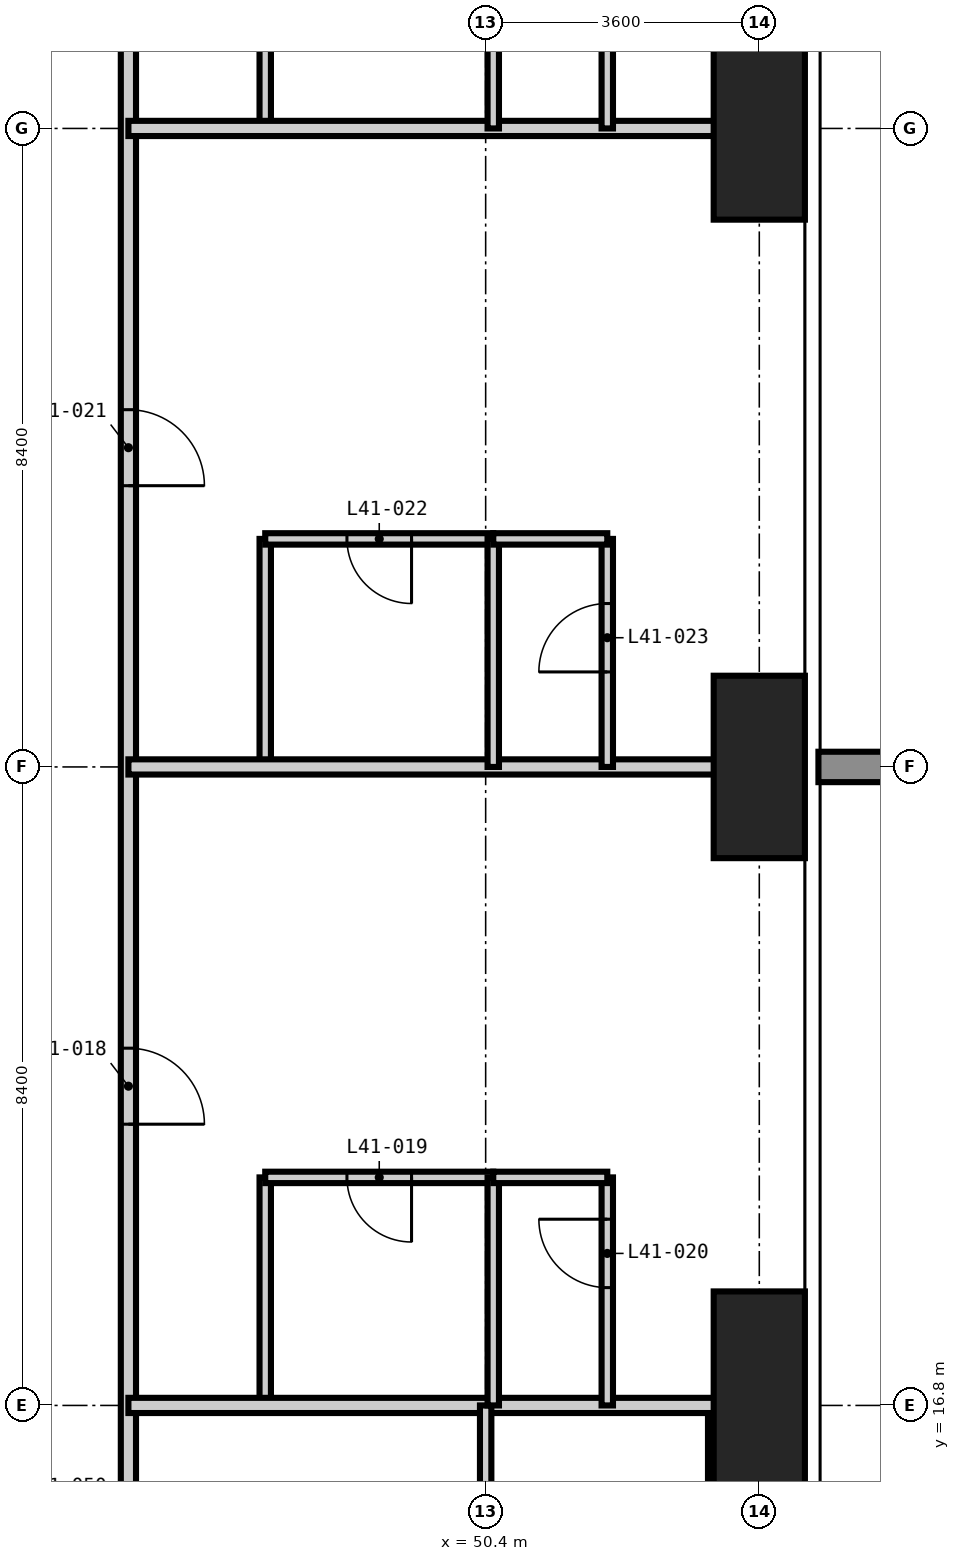
"""IFC4 building model, lengths in metres.
Left out: names, types, materials, properties, quantities, classifications, styles, units other than length and angle.
Written with IfcOpenShell. Run it as: python <this file> out.ifc"""

import sys

from ifc_helpers import new_model, si_unit, direction, frame, frame_2d, origin, origin_2d, place, context, subcontext, project, spatial, rectangle, extrude, element, fill, save


model = new_model("IFC4")
c1 = context("Model", 3, precision=1e-05, world=origin(), true_north=direction((0.0, 1.0)))
c2 = subcontext(c1, "Body", "Model", "MODEL_VIEW")
j1 = project(units=[si_unit("LENGTHUNIT", "METRE"), si_unit("PLANEANGLEUNIT", "RADIAN")], contexts=[c1])
p1 = place(None, origin())
s1 = spatial("IfcSite", under=j1, at=p1, CompositionType="ELEMENT")
p2 = place(p1, origin())
s2 = spatial("IfcBuilding", under=s1, at=p2, CompositionType="ELEMENT")
p3 = place(p2, frame((0.0, 0.0, 162.6)))
s3 = spatial("IfcBuildingStorey", under=s2, at=p3, CompositionType="ELEMENT", Elevation=162.6)
p4 = place(p3, frame((54.0, 16.8, -0.35), z_axis=(0.0, 0.0, 1.0), x_axis=(1.0, 0.0, 0.0)))
e1 = element("IfcColumn", 1, at=p4, inside=s3, PredefinedType="COLUMN", context=c2, shape_type="SweptSolid", body=[
    extrude(rectangle(XDim=1.2, YDim=3.0, at=origin_2d()), origin(), (0.0, 0.0, 1.0), 3.6),
])
for number, where, z_axis, x_axis in (
    (2, (54.0, 25.2, -0.35), (0.0, 0.0, 1.0), (1.0, 0.0, 0.0)),
    (3, (54.0, 33.6, -0.35), (0.0, 0.0, 1.0), (1.0, 0.0, 0.0)),
):
    element("IfcColumn", number, at=place(p3, frame(where, z_axis=z_axis, x_axis=x_axis)), inside=s3, PredefinedType="COLUMN", context=c2, shape_type="SweptSolid", body=[
        extrude(rectangle(XDim=1.2, YDim=2.4, at=origin_2d()), origin(), (0.0, 0.0, 1.0), 3.6),
    ])
for number, where, z_axis, x_axis in (
    (4, (47.5, 16.8, 0.0), (0.0, 0.0, 1.0), (0.0, 1.0, 0.0)),
    (5, (47.5, 25.2, 0.0), (0.0, 0.0, 1.0), (0.0, 1.0, 0.0)),
    (6, (47.5, 33.6, 0.0), (0.0, 0.0, 1.0), (0.0, 1.0, 0.0)),
):
    element("IfcWall", number, at=place(p3, frame(where, z_axis=z_axis, x_axis=x_axis)), inside=s3, PredefinedType="PARTITIONING", context=c2, shape_type="SweptSolid", body=[
        extrude(rectangle(XDim=3.0, YDim=0.15, at=frame_2d((1.5, 0.0))), origin(), (0.0, 0.0, 1.0), 3.25),
    ])
p5 = place(p3, frame((53.4, 13.2, 0.0), z_axis=(0.0, 0.0, 1.0), x_axis=(0.0, 1.0, 0.0)))
e7 = element("IfcWall", 7, at=p5, inside=s3, PredefinedType="PARTITIONING", context=c2, shape_type="SweptSolid", body=[
    extrude(rectangle(XDim=3.6, YDim=0.15, at=frame_2d((1.8, 0.0))), origin(), (0.0, 0.0, 1.0), 3.25),
])
p6 = place(p5, frame((1.175, 0.0, 0.0)))
e8 = element("IfcOpeningElement", 8, at=p6, cuts=e7, PredefinedType="OPENING", context=c2, shape_type="SweptSolid", body=[
    extrude(rectangle(XDim=0.85, YDim=2.1, at=frame_2d((0.425, 1.05))), frame((0.0, 0.085, 0.0), z_axis=(0.0, -1.0, 0.0), x_axis=(1.0, 0.0, 0.0)), (0.0, 0.0, 1.0), 0.17),
])
p7 = place(p3, frame((47.5, 19.8, 0.0), z_axis=(0.0, 0.0, 1.0), x_axis=(1.0, 0.0, 0.0)))
e9 = element("IfcWall", 9, at=p7, inside=s3, PredefinedType="PARTITIONING", context=c2, shape_type="SweptSolid", body=[
    extrude(rectangle(XDim=3.0, YDim=0.15, at=frame_2d((1.5, 0.0))), origin(), (0.0, 0.0, 1.0), 3.25),
])
p8 = place(p7, frame((1.075, 0.0, 0.0)))
e10 = element("IfcOpeningElement", 10, at=p8, cuts=e9, PredefinedType="OPENING", context=c2, shape_type="SweptSolid", body=[
    extrude(rectangle(XDim=0.85, YDim=2.1, at=frame_2d((0.425, 1.05))), frame((0.0, 0.085, 0.0), z_axis=(0.0, -1.0, 0.0), x_axis=(1.0, 0.0, 0.0)), (0.0, 0.0, 1.0), 0.17),
])
p9 = place(p3, frame((47.5, 28.2, 0.0), z_axis=(0.0, 0.0, 1.0), x_axis=(1.0, 0.0, 0.0)))
e11 = element("IfcWall", 11, at=p9, inside=s3, PredefinedType="PARTITIONING", context=c2, shape_type="SweptSolid", body=[
    extrude(rectangle(XDim=3.0, YDim=0.15, at=frame_2d((1.5, 0.0))), origin(), (0.0, 0.0, 1.0), 3.25),
])
p10 = place(p9, frame((1.075, 0.0, 0.0)))
e12 = element("IfcOpeningElement", 12, at=p10, cuts=e11, PredefinedType="OPENING", context=c2, shape_type="SweptSolid", body=[
    extrude(rectangle(XDim=0.85, YDim=2.1, at=frame_2d((0.425, 1.05))), frame((0.0, 0.085, 0.0), z_axis=(0.0, -1.0, 0.0), x_axis=(1.0, 0.0, 0.0)), (0.0, 0.0, 1.0), 0.17),
])
p11 = place(p3, frame((45.7, 44.5, 0.0), z_axis=(0.0, 0.0, 1.0), x_axis=(0.0, -1.0, 0.0)))
e13 = element("IfcWall", 13, at=p11, inside=s3, PredefinedType="PARTITIONING", context=c2, shape_type="SweptSolid", body=[
    extrude(rectangle(XDim=30.8, YDim=0.2, at=frame_2d((15.4, 0.0))), origin(), (0.0, 0.0, 1.0), 3.25),
])
p12 = place(p11, frame((23.0, 0.0, 0.0)))
e14 = element("IfcOpeningElement", 14, at=p12, cuts=e13, PredefinedType="OPENING", context=c2, shape_type="SweptSolid", body=[
    extrude(rectangle(XDim=1.0, YDim=2.2, at=frame_2d((0.5, 1.1))), frame((0.0, 0.11, 0.0), z_axis=(0.0, -1.0, 0.0), x_axis=(1.0, 0.0, 0.0)), (0.0, 0.0, 1.0), 0.22),
])
p13 = place(p11, frame((14.6, 0.0, 0.0)))
e15 = element("IfcOpeningElement", 15, at=p13, cuts=e13, PredefinedType="OPENING", context=c2, shape_type="SweptSolid", body=[
    extrude(rectangle(XDim=1.0, YDim=2.2, at=frame_2d((0.5, 1.1))), frame((0.0, 0.11, 0.0), z_axis=(0.0, -1.0, 0.0), x_axis=(1.0, 0.0, 0.0)), (0.0, 0.0, 1.0), 0.22),
])
p14 = place(p11, frame((6.2, 0.0, 0.0)))
e16 = element("IfcOpeningElement", 16, at=p14, cuts=e13, PredefinedType="OPENING", context=c2, shape_type="SweptSolid", body=[
    extrude(rectangle(XDim=1.0, YDim=2.2, at=frame_2d((0.5, 1.1))), frame((0.0, 0.11, 0.0), z_axis=(0.0, -1.0, 0.0), x_axis=(1.0, 0.0, 0.0)), (0.0, 0.0, 1.0), 0.22),
])
p15 = place(p11, frame((28.75, 0.0, 0.0)))
e17 = element("IfcOpeningElement", 17, at=p15, cuts=e13, PredefinedType="OPENING", context=c2, shape_type="SweptSolid", body=[
    extrude(rectangle(XDim=1.0, YDim=2.2, at=frame_2d((0.5, 1.1))), frame((0.0, 0.11, 0.0), z_axis=(0.0, -1.0, 0.0), x_axis=(1.0, 0.0, 0.0)), (0.0, 0.0, 1.0), 0.22),
])
p16 = place(p11, frame((0.75, 0.0, 0.0)))
e18 = element("IfcOpeningElement", 18, at=p16, cuts=e13, PredefinedType="OPENING", context=c2, shape_type="SweptSolid", body=[
    extrude(rectangle(XDim=1.0, YDim=2.2, at=frame_2d((0.5, 1.1))), frame((0.0, 0.11, 0.0), z_axis=(0.0, -1.0, 0.0), x_axis=(1.0, 0.0, 0.0)), (0.0, 0.0, 1.0), 0.22),
])
for number, where, z_axis, x_axis in (
    (19, (45.7, 16.8, 0.0), (0.0, 0.0, 1.0), (1.0, 0.0, 0.0)),
    (20, (45.7, 25.2, 0.0), (0.0, 0.0, 1.0), (1.0, 0.0, 0.0)),
    (21, (45.7, 33.6, 0.0), (0.0, 0.0, 1.0), (1.0, 0.0, 0.0)),
):
    element("IfcWall", number, at=place(p3, frame(where, z_axis=z_axis, x_axis=x_axis)), inside=s3, PredefinedType="PARTITIONING", context=c2, shape_type="SweptSolid", body=[
        extrude(rectangle(XDim=8.918, YDim=0.2, at=frame_2d((4.459, 0.0))), origin(), (0.0, 0.0, 1.0), 3.25),
    ])
p17 = place(p3, frame((50.4, 4.182, 0.0), z_axis=(0.0, 0.0, 1.0), x_axis=(0.0, 1.0, 0.0)))
e22 = element("IfcWall", 22, at=p17, inside=s3, PredefinedType="PARTITIONING", context=c2, shape_type="SweptSolid", body=[
    extrude(rectangle(XDim=12.618, YDim=0.15, at=frame_2d((6.309, 0.0))), origin(), (0.0, 0.0, 1.0), 3.25),
])
p18 = place(p17, frame((2.868, 0.0, 0.0)))
e23 = element("IfcOpeningElement", 23, at=p18, cuts=e22, PredefinedType="OPENING", context=c2, shape_type="SweptSolid", body=[
    extrude(rectangle(XDim=0.9, YDim=2.1, at=frame_2d((0.45, 1.05))), frame((0.0, 0.085, 0.0), z_axis=(0.0, -1.0, 0.0), x_axis=(1.0, 0.0, 0.0)), (0.0, 0.0, 1.0), 0.17),
])
for number, where, z_axis, x_axis in (
    (24, (50.5, 16.8, 0.0), (0.0, 0.0, 1.0), (0.0, 1.0, 0.0)),
    (25, (50.5, 25.2, 0.0), (0.0, 0.0, 1.0), (0.0, 1.0, 0.0)),
    (26, (50.5, 33.6, 0.0), (0.0, 0.0, 1.0), (0.0, 1.0, 0.0)),
):
    element("IfcWall", number, at=place(p3, frame(where, z_axis=z_axis, x_axis=x_axis)), inside=s3, PredefinedType="PARTITIONING", context=c2, shape_type="SweptSolid", body=[
        extrude(rectangle(XDim=3.0, YDim=0.15, at=frame_2d((1.5, 0.0))), origin(), (0.0, 0.0, 1.0), 3.25),
    ])
p19 = place(p3, frame((52.0, 16.8, 0.0), z_axis=(0.0, 0.0, 1.0), x_axis=(0.0, 1.0, 0.0)))
e27 = element("IfcWall", 27, at=p19, inside=s3, PredefinedType="PARTITIONING", context=c2, shape_type="SweptSolid", body=[
    extrude(rectangle(XDim=3.0, YDim=0.15, at=frame_2d((1.5, 0.0))), origin(), (0.0, 0.0, 1.0), 3.25),
])
p20 = place(p19, frame((1.55, 0.0, 0.0)))
e28 = element("IfcOpeningElement", 28, at=p20, cuts=e27, PredefinedType="OPENING", context=c2, shape_type="SweptSolid", body=[
    extrude(rectangle(XDim=0.9, YDim=2.1, at=frame_2d((0.45, 1.05))), frame((0.0, 0.085, 0.0), z_axis=(0.0, -1.0, 0.0), x_axis=(1.0, 0.0, 0.0)), (0.0, 0.0, 1.0), 0.17),
])
p21 = place(p3, frame((52.0, 25.2, 0.0), z_axis=(0.0, 0.0, 1.0), x_axis=(0.0, 1.0, 0.0)))
e29 = element("IfcWall", 29, at=p21, inside=s3, PredefinedType="PARTITIONING", context=c2, shape_type="SweptSolid", body=[
    extrude(rectangle(XDim=3.0, YDim=0.15, at=frame_2d((1.5, 0.0))), origin(), (0.0, 0.0, 1.0), 3.25),
])
p22 = place(p21, frame((1.25, 0.0, 0.0)))
e30 = element("IfcOpeningElement", 30, at=p22, cuts=e29, PredefinedType="OPENING", context=c2, shape_type="SweptSolid", body=[
    extrude(rectangle(XDim=0.9, YDim=2.1, at=frame_2d((0.45, 1.05))), frame((0.0, 0.085, 0.0), z_axis=(0.0, -1.0, 0.0), x_axis=(1.0, 0.0, 0.0)), (0.0, 0.0, 1.0), 0.17),
])
p23 = place(p3, frame((52.0, 33.6, 0.0), z_axis=(0.0, 0.0, 1.0), x_axis=(0.0, 1.0, 0.0)))
e31 = element("IfcWall", 31, at=p23, inside=s3, PredefinedType="PARTITIONING", context=c2, shape_type="SweptSolid", body=[
    extrude(rectangle(XDim=3.0, YDim=0.15, at=frame_2d((1.5, 0.0))), origin(), (0.0, 0.0, 1.0), 3.25),
])
p24 = place(p23, frame((1.25, 0.0, 0.0)))
e32 = element("IfcOpeningElement", 32, at=p24, cuts=e31, PredefinedType="OPENING", context=c2, shape_type="SweptSolid", body=[
    extrude(rectangle(XDim=0.9, YDim=2.1, at=frame_2d((0.45, 1.05))), frame((0.0, 0.085, 0.0), z_axis=(0.0, -1.0, 0.0), x_axis=(1.0, 0.0, 0.0)), (0.0, 0.0, 1.0), 0.17),
])
for number, where, z_axis, x_axis in (
    (33, (50.5, 19.8, 0.0), (0.0, 0.0, 1.0), (1.0, 0.0, 0.0)),
    (34, (50.5, 28.2, 0.0), (0.0, 0.0, 1.0), (1.0, 0.0, 0.0)),
):
    element("IfcWall", number, at=place(p3, frame(where, z_axis=z_axis, x_axis=x_axis)), inside=s3, PredefinedType="PARTITIONING", context=c2, shape_type="SweptSolid", body=[
        extrude(rectangle(XDim=1.5, YDim=0.15, at=frame_2d((0.75, 0.0))), origin(), (0.0, 0.0, 1.0), 3.25),
    ])
p25 = place(p12, origin())
e35 = element("IfcDoor", 35, at=p25, inside=s3, OperationType="SINGLE_SWING_RIGHT", PredefinedType="DOOR", context=c2, shape_type="SweptSolid", body=[
    extrude(rectangle(XDim=1.0, YDim=2.2, at=frame_2d((0.5, 1.1))), frame((0.0, 0.025, 0.0), z_axis=(0.0, -1.0, 0.0), x_axis=(1.0, 0.0, 0.0)), (0.0, 0.0, 1.0), 0.05),
])
fill(e14, e35)
p26 = place(p8, frame((0.85, 0.0, 0.0), z_axis=(0.0, 0.0, 1.0), x_axis=(-1.0, 0.0, 0.0)))
e36 = element("IfcDoor", 36, at=p26, inside=s3, OperationType="SINGLE_SWING_LEFT", PredefinedType="DOOR", context=c2, shape_type="SweptSolid", body=[
    extrude(rectangle(XDim=0.85, YDim=2.1, at=frame_2d((0.425, 1.05))), frame((0.0, 0.025, 0.0), z_axis=(0.0, -1.0, 0.0), x_axis=(1.0, 0.0, 0.0)), (0.0, 0.0, 1.0), 0.05),
])
fill(e10, e36)
p27 = place(p20, origin())
e37 = element("IfcDoor", 37, at=p27, inside=s3, OperationType="SINGLE_SWING_RIGHT", PredefinedType="DOOR", context=c2, shape_type="SweptSolid", body=[
    extrude(rectangle(XDim=0.9, YDim=2.1, at=frame_2d((0.45, 1.05))), frame((0.0, 0.025, 0.0), z_axis=(0.0, -1.0, 0.0), x_axis=(1.0, 0.0, 0.0)), (0.0, 0.0, 1.0), 0.05),
])
fill(e28, e37)
p28 = place(p13, origin())
e38 = element("IfcDoor", 38, at=p28, inside=s3, OperationType="SINGLE_SWING_RIGHT", PredefinedType="DOOR", context=c2, shape_type="SweptSolid", body=[
    extrude(rectangle(XDim=1.0, YDim=2.2, at=frame_2d((0.5, 1.1))), frame((0.0, 0.025, 0.0), z_axis=(0.0, -1.0, 0.0), x_axis=(1.0, 0.0, 0.0)), (0.0, 0.0, 1.0), 0.05),
])
fill(e15, e38)
p29 = place(p10, frame((0.85, 0.0, 0.0), z_axis=(0.0, 0.0, 1.0), x_axis=(-1.0, 0.0, 0.0)))
e39 = element("IfcDoor", 39, at=p29, inside=s3, OperationType="SINGLE_SWING_LEFT", PredefinedType="DOOR", context=c2, shape_type="SweptSolid", body=[
    extrude(rectangle(XDim=0.85, YDim=2.1, at=frame_2d((0.425, 1.05))), frame((0.0, 0.025, 0.0), z_axis=(0.0, -1.0, 0.0), x_axis=(1.0, 0.0, 0.0)), (0.0, 0.0, 1.0), 0.05),
])
fill(e12, e39)
p30 = place(p22, origin())
e40 = element("IfcDoor", 40, at=p30, inside=s3, OperationType="SINGLE_SWING_LEFT", PredefinedType="DOOR", context=c2, shape_type="SweptSolid", body=[
    extrude(rectangle(XDim=0.9, YDim=2.1, at=frame_2d((0.45, 1.05))), frame((0.0, 0.025, 0.0), z_axis=(0.0, -1.0, 0.0), x_axis=(1.0, 0.0, 0.0)), (0.0, 0.0, 1.0), 0.05),
])
fill(e30, e40)
save(model, sys.argv[1])
